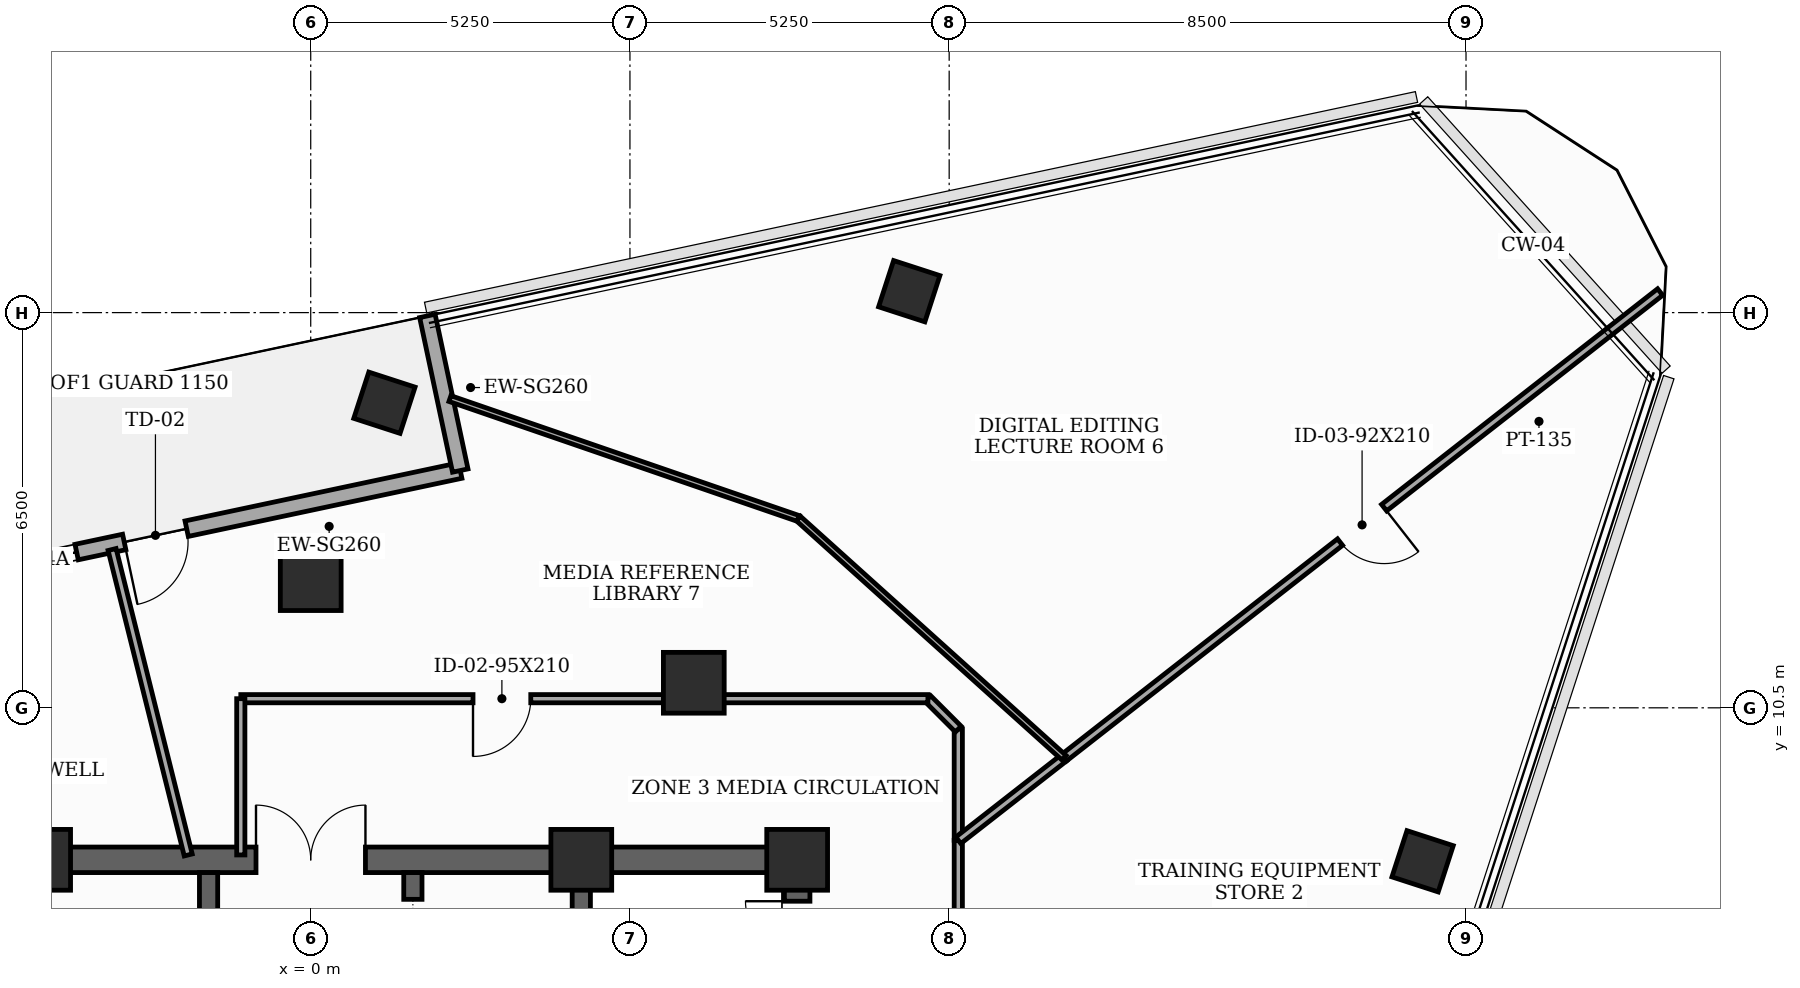
"""IFC4 building model, lengths in metres.
Left out: names, types, materials, properties, quantities, classifications, styles, units other than length and angle.
Written with IfcOpenShell. Run it as: python <this file> out.ifc"""

import sys

from ifc_helpers import new_model, si_unit, direction, frame, frame_2d, origin, origin_2d, place, context, subcontext, project, spatial, rectangle, extrude, element, fill, save


model = new_model("IFC4")
c1 = context("Model", 3, precision=1e-05, world=origin(), true_north=direction((0.0, 1.0)))
c2 = subcontext(c1, "Body", "Model", "MODEL_VIEW")
j1 = project(units=[si_unit("LENGTHUNIT", "METRE"), si_unit("PLANEANGLEUNIT", "RADIAN")], contexts=[c1])
p1 = place(None, origin())
s1 = spatial("IfcSite", under=j1, at=p1, CompositionType="ELEMENT")
p2 = place(p1, origin())
s2 = spatial("IfcBuilding", under=s1, at=p2, CompositionType="ELEMENT")
p3 = place(p2, frame((0.0, 0.0, 290.6)))
s3 = spatial("IfcBuildingStorey", under=s2, at=p3, CompositionType="ELEMENT", Elevation=290.6)
for number, where, z_axis, x_axis in (
    (1, (8.0, 8.0, 0.0), (0.0, 0.0, 1.0), (1.0, 0.0, 0.0)),
    (2, (4.45, 8.0, 0.0), (0.0, 0.0, 1.0), (1.0, 0.0, 0.0)),
    (3, (-4.45, 8.0, 0.0), (0.0, 0.0, 1.0), (1.0, 0.0, 0.0)),
    (4, (6.3, 10.912, 0.0), (0.0, 0.0, 1.0), (1.0, 0.0, 0.0)),
    (5, (0.0, 12.6, 0.0), (0.0, 0.0, 1.0), (1.0, 0.0, 0.0)),
):
    element("IfcColumn", number, at=place(p3, frame(where, z_axis=z_axis, x_axis=x_axis)), inside=s3, PredefinedType="COLUMN", context=c2, shape_type="SweptSolid", body=[
        extrude(rectangle(XDim=1.0, YDim=1.0, at=origin_2d()), origin(), (0.0, 0.0, 1.0), 3.7),
    ])
for number, where, z_axis, x_axis in (
    (6, (18.286, 7.976, 0.0), (0.0, 0.0, 1.0), (0.309, 0.951, 0.0)),
    (7, (9.844, 17.352, 0.0), (0.0, 0.0, 1.0), (0.309, 0.951, 0.0)),
    (8, (1.212, 15.518, 0.0), (0.0, 0.0, 1.0), (0.309, 0.951, 0.0)),
):
    element("IfcColumn", number, at=place(p3, frame(where, z_axis=z_axis, x_axis=x_axis)), inside=s3, PredefinedType="COLUMN", context=c2, shape_type="SweptSolid", body=[
        extrude(rectangle(XDim=0.8, YDim=0.8, at=origin_2d()), origin(), (0.0, 0.0, 1.0), 3.7),
    ])
p4 = place(p3, frame((2.459, 14.402, 0.0), z_axis=(0.0, 0.0, 1.0), x_axis=(-0.978149082982, -0.207904717268, 0.0)))
e9 = element("IfcWall", 9, at=p4, inside=s3, PredefinedType="SOLIDWALL", context=c2, shape_type="SweptSolid", body=[
    extrude(rectangle(XDim=10.8, YDim=0.26, at=frame_2d((5.4, 0.0))), origin(), (0.0, 0.0, 1.0), 3.5),
])
p5 = place(p4, frame((4.6, 0.0, 0.0)))
e10 = element("IfcOpeningElement", 10, at=p5, cuts=e9, PredefinedType="OPENING", context=c2, shape_type="SweptSolid", body=[
    extrude(rectangle(XDim=1.05, YDim=2.08, at=frame_2d((0.525, 1.04))), frame((0.0, 0.14, 0.0), z_axis=(0.0, -1.0, 0.0), x_axis=(1.0, 0.0, 0.0)), (0.0, 0.0, 1.0), 0.28),
])
p6 = place(p4, frame((6.45, 0.0, 0.85)))
e11 = element("IfcOpeningElement", 11, at=p6, cuts=e9, PredefinedType="OPENING", context=c2, shape_type="SweptSolid", body=[
    extrude(rectangle(XDim=1.3, YDim=1.25, at=frame_2d((0.65, 0.625))), frame((0.0, 0.14, 0.0), z_axis=(0.0, -1.0, 0.0), x_axis=(1.0, 0.0, 0.0)), (0.0, 0.0, 1.0), 0.28),
])
p7 = place(p3, frame((1.919, 16.946, 0.0), z_axis=(0.0, 0.0, 1.0), x_axis=(0.207893569688, -0.978151452323, 0.0)))
e12 = element("IfcWall", 12, at=p7, inside=s3, PredefinedType="SOLIDWALL", context=c2, shape_type="SweptSolid", body=[
    extrude(rectangle(XDim=2.6, YDim=0.26, at=frame_2d((1.3, 0.0))), origin(), (0.0, 0.0, 1.0), 3.5),
])
p8 = place(p3, frame((8.0, -8.0, 0.0), z_axis=(0.0, 0.0, 1.0), x_axis=(0.0, 1.0, 0.0)))
e13 = element("IfcWall", 13, at=p8, inside=s3, PredefinedType="SHEAR", context=c2, shape_type="SweptSolid", body=[
    extrude(rectangle(XDim=16.0, YDim=0.42, at=frame_2d((8.0, 0.0))), origin(), (0.0, 0.0, 1.0), 3.5),
])
p9 = place(p8, frame((9.6, 0.0, 0.0)))
e14 = element("IfcOpeningElement", 14, at=p9, cuts=e13, PredefinedType="OPENING", context=c2, shape_type="SweptSolid", body=[
    extrude(rectangle(XDim=1.05, YDim=2.15, at=frame_2d((0.525, 1.075))), frame((0.0, 0.22, 0.0), z_axis=(0.0, -1.0, 0.0), x_axis=(1.0, 0.0, 0.0)), (0.0, 0.0, 1.0), 0.44),
])
p10 = place(p8, frame((14.469, 0.0, 0.0)))
e15 = element("IfcOpeningElement", 15, at=p10, cuts=e13, PredefinedType="OPENING", context=c2, shape_type="SweptSolid", body=[
    extrude(rectangle(XDim=0.85, YDim=2.02, at=frame_2d((0.425, 1.01))), frame((0.0, 0.22, 0.0), z_axis=(0.0, -1.0, 0.0), x_axis=(1.0, 0.0, 0.0)), (0.0, 0.0, 1.0), 0.44),
])
p11 = place(p3, frame((-8.0, 8.0, 0.0), z_axis=(0.0, 0.0, 1.0), x_axis=(1.0, 0.0, 0.0)))
e16 = element("IfcWall", 16, at=p11, inside=s3, PredefinedType="SHEAR", context=c2, shape_type="SweptSolid", body=[
    extrude(rectangle(XDim=16.0, YDim=0.42, at=frame_2d((8.0, 0.0))), origin(), (0.0, 0.0, 1.0), 3.5),
])
p12 = place(p11, frame((7.1, 0.0, 0.0)))
e17 = element("IfcOpeningElement", 17, at=p12, cuts=e16, PredefinedType="OPENING", context=c2, shape_type="SweptSolid", body=[
    extrude(rectangle(XDim=1.8, YDim=2.15, at=frame_2d((0.9, 1.075))), frame((0.0, 0.22, 0.0), z_axis=(0.0, -1.0, 0.0), x_axis=(1.0, 0.0, 0.0)), (0.0, 0.0, 1.0), 0.44),
])
p13 = place(p3, frame((4.45, -7.79, 0.0), z_axis=(0.0, 0.0, 1.0), x_axis=(0.0, 1.0, 0.0)))
e18 = element("IfcWall", 18, at=p13, inside=s3, PredefinedType="SHEAR", context=c2, shape_type="SweptSolid", body=[
    extrude(rectangle(XDim=15.58, YDim=0.3, at=frame_2d((7.79, 0.0))), origin(), (0.0, 0.0, 1.0), 3.5),
])
p14 = place(p3, frame((-1.68, -4.85, 0.0), z_axis=(0.0, 0.0, 1.0), x_axis=(0.0, 1.0, 0.0)))
e19 = element("IfcWall", 19, at=p14, inside=s3, PredefinedType="SHEAR", context=c2, shape_type="SweptSolid", body=[
    extrude(rectangle(XDim=12.64, YDim=0.3, at=frame_2d((6.32, 0.0))), origin(), (0.0, 0.0, 1.0), 3.5),
])
p15 = place(p14, frame((1.65, 0.0, 0.0)))
e20 = element("IfcOpeningElement", 20, at=p15, cuts=e19, PredefinedType="OPENING", context=c2, shape_type="SweptSolid", body=[
    extrude(rectangle(XDim=0.95, YDim=2.1, at=frame_2d((0.475, 1.05))), frame((0.0, 0.16, 0.0), z_axis=(0.0, -1.0, 0.0), x_axis=(1.0, 0.0, 0.0)), (0.0, 0.0, 1.0), 0.32),
])
p16 = place(p14, frame((5.9, 0.0, 0.0)))
e21 = element("IfcOpeningElement", 21, at=p16, cuts=e19, PredefinedType="OPENING", context=c2, shape_type="SweptSolid", body=[
    extrude(rectangle(XDim=0.95, YDim=2.1, at=frame_2d((0.475, 1.05))), frame((0.0, 0.16, 0.0), z_axis=(0.0, -1.0, 0.0), x_axis=(1.0, 0.0, 0.0)), (0.0, 0.0, 1.0), 0.32),
])
p17 = place(p14, frame((10.1, 0.0, 0.0)))
e22 = element("IfcOpeningElement", 22, at=p17, cuts=e19, PredefinedType="OPENING", context=c2, shape_type="SweptSolid", body=[
    extrude(rectangle(XDim=0.95, YDim=2.1, at=frame_2d((0.475, 1.05))), frame((0.0, 0.16, 0.0), z_axis=(0.0, -1.0, 0.0), x_axis=(1.0, 0.0, 0.0)), (0.0, 0.0, 1.0), 0.32),
])
p18 = place(p3, frame((1.68, -4.85, 0.0), z_axis=(0.0, 0.0, 1.0), x_axis=(0.0, 1.0, 0.0)))
e23 = element("IfcWall", 23, at=p18, inside=s3, PredefinedType="SHEAR", context=c2, shape_type="SweptSolid", body=[
    extrude(rectangle(XDim=12.64, YDim=0.3, at=frame_2d((6.32, 0.0))), origin(), (0.0, 0.0, 1.0), 3.5),
])
p19 = place(p18, frame((0.55, 0.0, 0.0)))
e24 = element("IfcOpeningElement", 24, at=p19, cuts=e23, PredefinedType="OPENING", context=c2, shape_type="SweptSolid", body=[
    extrude(rectangle(XDim=1.1, YDim=2.1, at=frame_2d((0.55, 1.05))), frame((0.0, 0.16, 0.0), z_axis=(0.0, -1.0, 0.0), x_axis=(1.0, 0.0, 0.0)), (0.0, 0.0, 1.0), 0.32),
])
p20 = place(p18, frame((2.65, 0.0, 0.0)))
e25 = element("IfcOpeningElement", 25, at=p20, cuts=e23, PredefinedType="OPENING", context=c2, shape_type="SweptSolid", body=[
    extrude(rectangle(XDim=1.1, YDim=2.1, at=frame_2d((0.55, 1.05))), frame((0.0, 0.16, 0.0), z_axis=(0.0, -1.0, 0.0), x_axis=(1.0, 0.0, 0.0)), (0.0, 0.0, 1.0), 0.32),
])
p21 = place(p18, frame((4.75, 0.0, 0.0)))
e26 = element("IfcOpeningElement", 26, at=p21, cuts=e23, PredefinedType="OPENING", context=c2, shape_type="SweptSolid", body=[
    extrude(rectangle(XDim=1.1, YDim=2.1, at=frame_2d((0.55, 1.05))), frame((0.0, 0.16, 0.0), z_axis=(0.0, -1.0, 0.0), x_axis=(1.0, 0.0, 0.0)), (0.0, 0.0, 1.0), 0.32),
])
p22 = place(p18, frame((8.2, 0.0, 0.0)))
e27 = element("IfcOpeningElement", 27, at=p22, cuts=e23, PredefinedType="OPENING", context=c2, shape_type="SweptSolid", body=[
    extrude(rectangle(XDim=0.95, YDim=2.1, at=frame_2d((0.475, 1.05))), frame((0.0, 0.16, 0.0), z_axis=(0.0, -1.0, 0.0), x_axis=(1.0, 0.0, 0.0)), (0.0, 0.0, 1.0), 0.32),
])
p23 = place(p18, frame((11.25, 0.0, 0.0)))
e28 = element("IfcOpeningElement", 28, at=p23, cuts=e23, PredefinedType="OPENING", context=c2, shape_type="SweptSolid", body=[
    extrude(rectangle(XDim=0.95, YDim=2.1, at=frame_2d((0.475, 1.05))), frame((0.0, 0.16, 0.0), z_axis=(0.0, -1.0, 0.0), x_axis=(1.0, 0.0, 0.0)), (0.0, 0.0, 1.0), 0.32),
])
p24 = place(p3, frame((10.65, 4.225, 0.0), z_axis=(0.0, 0.0, 1.0), x_axis=(0.0, 1.0, 0.0)))
e29 = element("IfcWall", 29, at=p24, inside=s3, PredefinedType="PARTITIONING", context=c2, shape_type="SweptSolid", body=[
    extrude(rectangle(XDim=4.096, YDim=0.135, at=frame_2d((2.048, 0.0))), origin(), (0.0, 0.0, 1.0), 2.885),
])
p25 = place(p3, frame((10.65, 8.321, 0.0), z_axis=(0.0, 0.0, 1.0), x_axis=(0.0, 1.0, 0.0)))
e30 = element("IfcWall", 30, at=p25, inside=s3, PredefinedType="PARTITIONING", context=c2, shape_type="SweptSolid", body=[
    extrude(rectangle(XDim=1.829, YDim=0.135, at=frame_2d((0.915, 0.0))), origin(), (0.0, 0.0, 1.0), 3.5),
])
p26 = place(p3, frame((10.65, 10.15, 0.0), z_axis=(0.0, 0.0, 1.0), x_axis=(-0.707106781187, 0.707106781187, 0.0)))
e31 = element("IfcWall", 31, at=p26, inside=s3, PredefinedType="PARTITIONING", context=c2, shape_type="SweptSolid", body=[
    extrude(rectangle(XDim=0.707, YDim=0.135, at=frame_2d((0.354, 0.0))), origin(), (0.0, 0.0, 1.0), 3.5),
])
p27 = place(p3, frame((10.15, 10.65, 0.0), z_axis=(0.0, 0.0, 1.0), x_axis=(-1.0, 0.0, 0.0)))
e32 = element("IfcWall", 32, at=p27, inside=s3, PredefinedType="PARTITIONING", context=c2, shape_type="SweptSolid", body=[
    extrude(rectangle(XDim=11.3, YDim=0.135, at=frame_2d((5.65, 0.0))), origin(), (0.0, 0.0, 1.0), 2.885),
])
p28 = place(p27, frame((6.531, 0.0, 0.0)))
e33 = element("IfcOpeningElement", 33, at=p28, cuts=e32, PredefinedType="OPENING", context=c2, shape_type="SweptSolid", body=[
    extrude(rectangle(XDim=0.95, YDim=2.1, at=frame_2d((0.475, 1.05))), frame((0.0, 0.077, 0.0), z_axis=(0.0, -1.0, 0.0), x_axis=(1.0, 0.0, 0.0)), (0.0, 0.0, 1.0), 0.155),
])
p29 = place(p3, frame((-1.15, 10.65, 0.0), z_axis=(0.0, 0.0, 1.0), x_axis=(0.0, -1.0, 0.0)))
e34 = element("IfcWall", 34, at=p29, inside=s3, PredefinedType="PARTITIONING", context=c2, shape_type="SweptSolid", body=[
    extrude(rectangle(XDim=2.57, YDim=0.135, at=frame_2d((1.285, 0.0))), origin(), (0.0, 0.0, 1.0), 2.885),
])
p30 = place(p3, frame((22.192, 17.338, 0.0), z_axis=(0.0, 0.0, 1.0), x_axis=(-0.788006224946, -0.615667271703, 0.0)))
e35 = element("IfcWall", 35, at=p30, inside=s3, PredefinedType="PARTITIONING", context=c2, shape_type="SweptSolid", body=[
    extrude(rectangle(XDim=12.441, YDim=0.135, at=frame_2d((6.22, 0.0))), origin(), (0.0, 0.0, 1.0), 3.035),
])
p31 = place(p30, frame((5.76, 0.0, 0.0)))
e36 = element("IfcOpeningElement", 36, at=p31, cuts=e35, PredefinedType="OPENING", context=c2, shape_type="SweptSolid", body=[
    extrude(rectangle(XDim=0.92, YDim=2.1, at=frame_2d((0.46, 1.05))), frame((0.0, 0.077, 0.0), z_axis=(0.0, -1.0, 0.0), x_axis=(1.0, 0.0, 0.0)), (0.0, 0.0, 1.0), 0.155),
])
p32 = place(p3, frame((12.389, 9.679, 0.0), z_axis=(0.0, 0.0, 1.0), x_axis=(-0.788177008199, -0.615448619908, 0.0)))
e37 = element("IfcWall", 37, at=p32, inside=s3, PredefinedType="PARTITIONING", context=c2, shape_type="SweptSolid", body=[
    extrude(rectangle(XDim=2.206, YDim=0.135, at=frame_2d((1.103, 0.0))), origin(), (0.0, 0.0, 1.0), 3.5),
])
p33 = place(p3, frame((2.29, 15.586, 0.0), z_axis=(0.0, 0.0, 1.0), x_axis=(0.945564214682, -0.325435578745, 0.0)))
e38 = element("IfcWall", 38, at=p33, inside=s3, PredefinedType="MOVABLE", context=c2, shape_type="SweptSolid", body=[
    extrude(rectangle(XDim=6.059, YDim=0.1, at=frame_2d((3.03, 0.0))), origin(), (0.0, 0.0, 1.0), 3.035),
])
p34 = place(p3, frame((8.019, 13.614, 0.0), z_axis=(0.0, 0.0, 1.0), x_axis=(0.743110388877, -0.669168850099, 0.0)))
e39 = element("IfcWall", 39, at=p34, inside=s3, PredefinedType="MOVABLE", context=c2, shape_type="SweptSolid", body=[
    extrude(rectangle(XDim=5.881, YDim=0.1, at=frame_2d((2.94, 0.0))), origin(), (0.0, 0.0, 1.0), 3.035),
])
p35 = place(p3, frame((-3.267, 13.104, 0.0), z_axis=(0.0, 0.0, 1.0), x_axis=(0.241825418424, -0.970319775643, 0.0)))
e40 = element("IfcWall", 40, at=p35, inside=s3, PredefinedType="PARTITIONING", context=c2, shape_type="SweptSolid", body=[
    extrude(rectangle(XDim=5.177, YDim=0.135, at=frame_2d((2.588, 0.0))), origin(), (0.0, 0.0, 1.0), 2.885),
])
p36 = place(p5, frame((1.05, 0.0, 0.0), z_axis=(0.0, 0.0, 1.0), x_axis=(-1.0, 0.0, 0.0)))
e41 = element("IfcDoor", 41, at=p36, inside=s3, OperationType="SINGLE_SWING_LEFT", PredefinedType="DOOR", context=c2, shape_type="SweptSolid", body=[
    extrude(rectangle(XDim=1.05, YDim=2.08, at=frame_2d((0.525, 1.04))), frame((0.0, 0.025, 0.0), z_axis=(0.0, -1.0, 0.0), x_axis=(1.0, 0.0, 0.0)), (0.0, 0.0, 1.0), 0.05),
])
fill(e10, e41)
p37 = place(p6, origin())
e42 = element("IfcWindow", 42, at=p37, inside=s3, PartitioningType="SINGLE_PANEL", PredefinedType="WINDOW", context=c2, shape_type="SweptSolid", body=[
    extrude(rectangle(XDim=1.3, YDim=1.25, at=frame_2d((0.65, 0.625))), frame((0.0, 0.03, 0.0), z_axis=(0.0, -1.0, 0.0), x_axis=(1.0, 0.0, 0.0)), (0.0, 0.0, 1.0), 0.06),
])
fill(e11, e42)
p38 = place(p10, origin())
e43 = element("IfcDoor", 43, at=p38, inside=s3, OperationType="SINGLE_SWING_RIGHT", PredefinedType="TRAPDOOR", context=c2, shape_type="SweptSolid", body=[
    extrude(rectangle(XDim=0.85, YDim=2.02, at=frame_2d((0.425, 1.01))), frame((0.0, 0.025, 0.0), z_axis=(0.0, -1.0, 0.0), x_axis=(1.0, 0.0, 0.0)), (0.0, 0.0, 1.0), 0.05),
])
fill(e15, e43)
p39 = place(p12, origin())
e44 = element("IfcDoor", 44, at=p39, inside=s3, OperationType="DOUBLE_DOOR_SINGLE_SWING", PredefinedType="DOOR", context=c2, shape_type="SweptSolid", body=[
    extrude(rectangle(XDim=1.8, YDim=2.15, at=frame_2d((0.9, 1.075))), frame((0.0, 0.025, 0.0), z_axis=(0.0, -1.0, 0.0), x_axis=(1.0, 0.0, 0.0)), (0.0, 0.0, 1.0), 0.05),
])
fill(e17, e44)
p40 = place(p23, origin())
e45 = element("IfcDoor", 45, at=p40, inside=s3, OperationType="SLIDING_TO_LEFT", PredefinedType="DOOR", context=c2, shape_type="SweptSolid", body=[
    extrude(rectangle(XDim=0.95, YDim=2.1, at=frame_2d((0.475, 1.05))), frame((0.0, 0.025, 0.0), z_axis=(0.0, -1.0, 0.0), x_axis=(1.0, 0.0, 0.0)), (0.0, 0.0, 1.0), 0.05),
])
fill(e28, e45)
p41 = place(p28, origin())
e46 = element("IfcDoor", 46, at=p41, inside=s3, OperationType="SINGLE_SWING_RIGHT", PredefinedType="DOOR", context=c2, shape_type="SweptSolid", body=[
    extrude(rectangle(XDim=0.95, YDim=2.1, at=frame_2d((0.475, 1.05))), frame((0.0, 0.025, 0.0), z_axis=(0.0, -1.0, 0.0), x_axis=(1.0, 0.0, 0.0)), (0.0, 0.0, 1.0), 0.05),
])
fill(e33, e46)
p42 = place(p31, origin())
e47 = element("IfcDoor", 47, at=p42, inside=s3, OperationType="SINGLE_SWING_LEFT", PredefinedType="DOOR", context=c2, shape_type="SweptSolid", body=[
    extrude(rectangle(XDim=0.92, YDim=2.1, at=frame_2d((0.46, 1.05))), frame((0.0, 0.025, 0.0), z_axis=(0.0, -1.0, 0.0), x_axis=(1.0, 0.0, 0.0)), (0.0, 0.0, 1.0), 0.05),
])
fill(e36, e47)
save(model, sys.argv[1])
